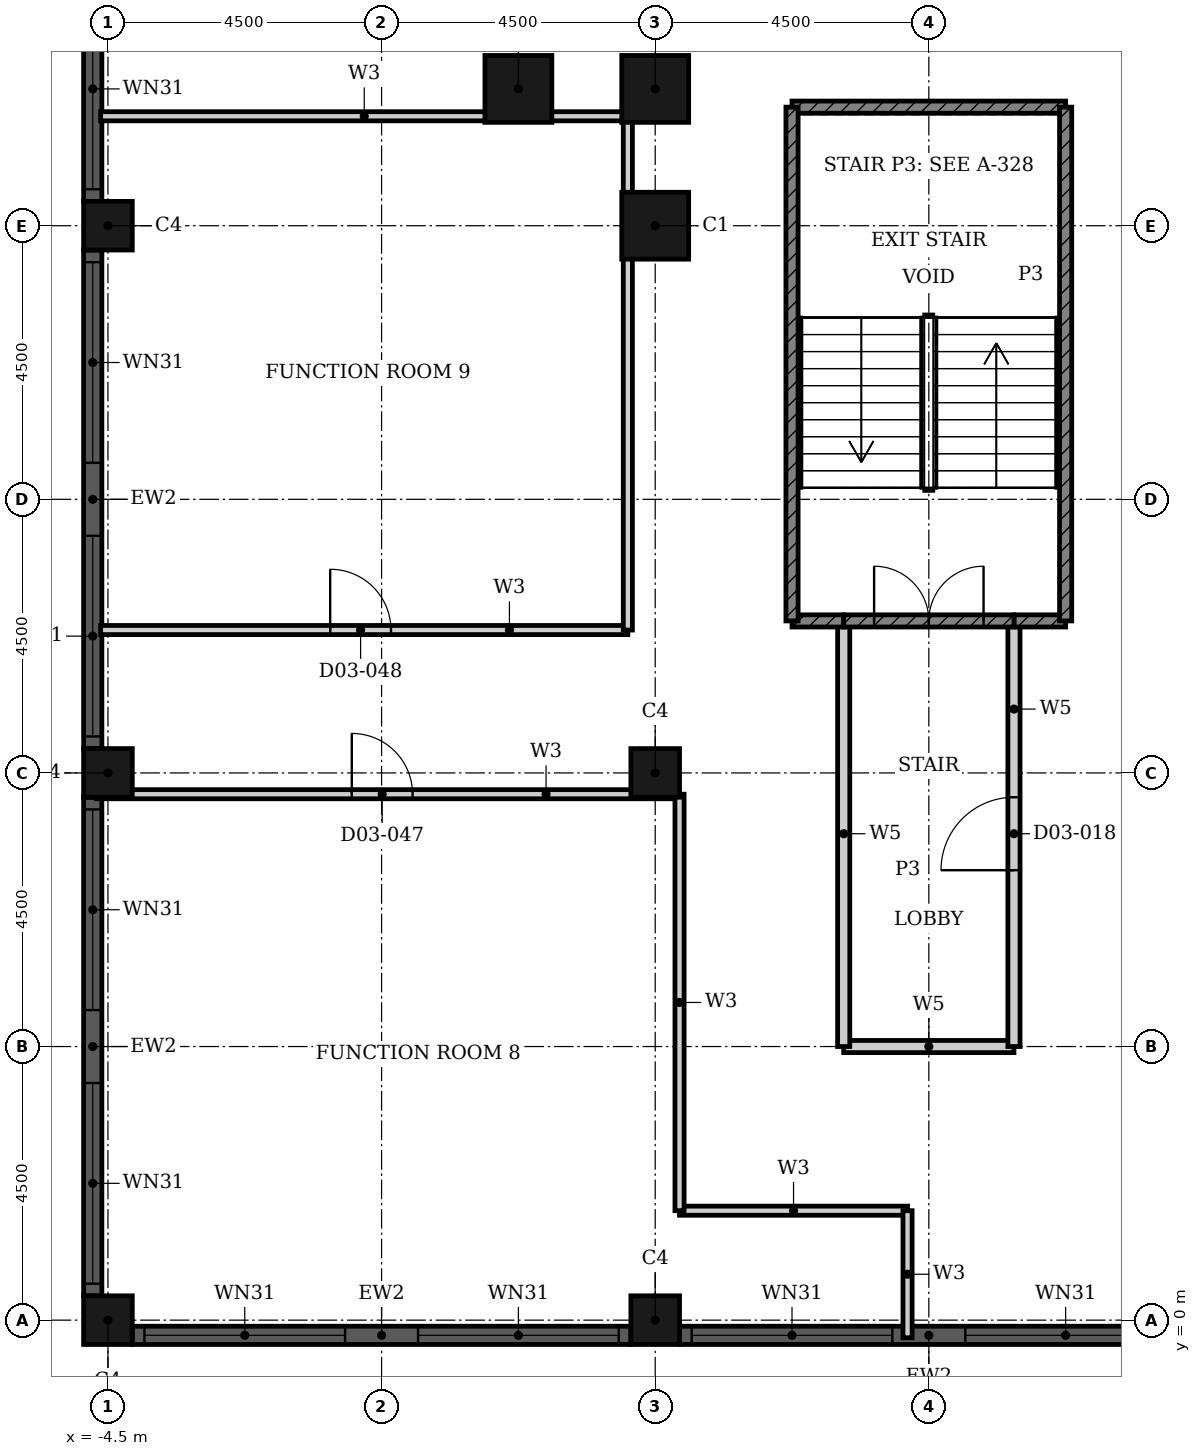
"""IFC4 building model, lengths in metres.
Left out: names, types, materials, properties, quantities, classifications, styles, units other than length and angle.
Written with IfcOpenShell. Run it as: python <this file> out.ifc"""

import sys

from ifc_helpers import new_model, si_unit, direction, frame, frame_2d, origin, origin_2d, place, context, subcontext, project, spatial, rectangle, hollow_rectangle, extrude, element, fill, save


model = new_model("IFC4")
c1 = context("Model", 3, precision=1e-05, world=origin(), true_north=direction((0.0, 1.0)))
c2 = subcontext(c1, "Body", "Model", "MODEL_VIEW")
j1 = project(units=[si_unit("LENGTHUNIT", "METRE"), si_unit("PLANEANGLEUNIT", "RADIAN")], contexts=[c1])
p1 = place(None, origin())
s1 = spatial("IfcSite", under=j1, at=p1, CompositionType="ELEMENT")
p2 = place(p1, origin())
s2 = spatial("IfcBuilding", under=s1, at=p2, CompositionType="ELEMENT")
p3 = place(p2, frame((0.0, 0.0, 17.4)))
s3 = spatial("IfcBuildingStorey", under=s2, at=p3, CompositionType="ELEMENT", Elevation=17.4)
for number, where, z_axis, x_axis in (
    (1, (2.25, 20.25, 0.0), (0.0, 0.0, 1.0), (1.0, 0.0, 0.0)),
    (2, (4.5, 20.25, 0.0), (0.0, 0.0, 1.0), (1.0, 0.0, 0.0)),
    (3, (4.5, 18.0, 0.0), (0.0, 0.0, 1.0), (1.0, 0.0, 0.0)),
):
    element("IfcColumn", number, at=place(p3, frame(where, z_axis=z_axis, x_axis=x_axis)), inside=s3, PredefinedType="COLUMN", context=c2, shape_type="SweptSolid", body=[
        extrude(hollow_rectangle(XDim=1.1, YDim=1.1, WallThickness=0.036, at=origin_2d()), origin(), (0.0, 0.0, 1.0), 6.6),
    ])
for number, where, z_axis, x_axis in (
    (4, (-4.5, 0.0, 0.0), (0.0, 0.0, 1.0), (1.0, 0.0, 0.0)),
    (5, (-4.5, 9.0, 0.0), (0.0, 0.0, 1.0), (1.0, 0.0, 0.0)),
    (6, (-4.5, 18.0, 0.0), (0.0, 0.0, 1.0), (1.0, 0.0, 0.0)),
    (7, (4.5, 0.0, 0.0), (0.0, 0.0, 1.0), (1.0, 0.0, 0.0)),
    (8, (4.5, 9.0, 0.0), (0.0, 0.0, 1.0), (1.0, 0.0, 0.0)),
):
    element("IfcColumn", number, at=place(p3, frame(where, z_axis=z_axis, x_axis=x_axis)), inside=s3, PredefinedType="COLUMN", context=c2, shape_type="SweptSolid", body=[
        extrude(hollow_rectangle(XDim=0.8, YDim=0.8, WallThickness=0.025, at=origin_2d()), origin(), (0.0, 0.0, 1.0), 6.6),
    ])
p4 = place(p3, frame((-4.75, 26.6, 0.0), z_axis=(0.0, 0.0, 1.0), x_axis=(0.0, -1.0, 0.0)))
e9 = element("IfcWall", 9, at=p4, inside=s3, PredefinedType="SOLIDWALL", context=c2, shape_type="SweptSolid", body=[
    extrude(rectangle(XDim=8.2, YDim=0.3, at=frame_2d((4.1, 0.0))), origin(), (0.0, 0.0, 1.0), 6.6),
])
p5 = place(p4, frame((0.2, 0.0, 0.9)))
e10 = element("IfcOpeningElement", 10, at=p5, cuts=e9, PredefinedType="OPENING", context=c2, shape_type="SweptSolid", body=[
    extrude(rectangle(XDim=3.3, YDim=3.6, at=frame_2d((1.65, 1.8))), frame((0.0, 0.16, 0.0), z_axis=(0.0, -1.0, 0.0), x_axis=(1.0, 0.0, 0.0)), (0.0, 0.0, 1.0), 0.32),
])
p6 = place(p4, frame((4.7, 0.0, 0.9)))
e11 = element("IfcOpeningElement", 11, at=p6, cuts=e9, PredefinedType="OPENING", context=c2, shape_type="SweptSolid", body=[
    extrude(rectangle(XDim=3.3, YDim=3.6, at=frame_2d((1.65, 1.8))), frame((0.0, 0.16, 0.0), z_axis=(0.0, -1.0, 0.0), x_axis=(1.0, 0.0, 0.0)), (0.0, 0.0, 1.0), 0.32),
])
p7 = place(p3, frame((-4.75, 17.6, 0.0), z_axis=(0.0, 0.0, 1.0), x_axis=(0.0, -1.0, 0.0)))
e12 = element("IfcWall", 12, at=p7, inside=s3, PredefinedType="SOLIDWALL", context=c2, shape_type="SweptSolid", body=[
    extrude(rectangle(XDim=8.2, YDim=0.3, at=frame_2d((4.1, 0.0))), origin(), (0.0, 0.0, 1.0), 6.6),
])
p8 = place(p7, frame((0.2, 0.0, 0.9)))
e13 = element("IfcOpeningElement", 13, at=p8, cuts=e12, PredefinedType="OPENING", context=c2, shape_type="SweptSolid", body=[
    extrude(rectangle(XDim=3.3, YDim=3.6, at=frame_2d((1.65, 1.8))), frame((0.0, 0.16, 0.0), z_axis=(0.0, -1.0, 0.0), x_axis=(1.0, 0.0, 0.0)), (0.0, 0.0, 1.0), 0.32),
])
p9 = place(p7, frame((4.7, 0.0, 0.9)))
e14 = element("IfcOpeningElement", 14, at=p9, cuts=e12, PredefinedType="OPENING", context=c2, shape_type="SweptSolid", body=[
    extrude(rectangle(XDim=3.3, YDim=3.6, at=frame_2d((1.65, 1.8))), frame((0.0, 0.16, 0.0), z_axis=(0.0, -1.0, 0.0), x_axis=(1.0, 0.0, 0.0)), (0.0, 0.0, 1.0), 0.32),
])
p10 = place(p3, frame((-4.75, 8.6, 0.0), z_axis=(0.0, 0.0, 1.0), x_axis=(0.0, -1.0, 0.0)))
e15 = element("IfcWall", 15, at=p10, inside=s3, PredefinedType="SOLIDWALL", context=c2, shape_type="SweptSolid", body=[
    extrude(rectangle(XDim=8.2, YDim=0.3, at=frame_2d((4.1, 0.0))), origin(), (0.0, 0.0, 1.0), 6.6),
])
p11 = place(p10, frame((0.2, 0.0, 0.9)))
e16 = element("IfcOpeningElement", 16, at=p11, cuts=e15, PredefinedType="OPENING", context=c2, shape_type="SweptSolid", body=[
    extrude(rectangle(XDim=3.3, YDim=3.6, at=frame_2d((1.65, 1.8))), frame((0.0, 0.16, 0.0), z_axis=(0.0, -1.0, 0.0), x_axis=(1.0, 0.0, 0.0)), (0.0, 0.0, 1.0), 0.32),
])
p12 = place(p10, frame((4.7, 0.0, 0.9)))
e17 = element("IfcOpeningElement", 17, at=p12, cuts=e15, PredefinedType="OPENING", context=c2, shape_type="SweptSolid", body=[
    extrude(rectangle(XDim=3.3, YDim=3.6, at=frame_2d((1.65, 1.8))), frame((0.0, 0.16, 0.0), z_axis=(0.0, -1.0, 0.0), x_axis=(1.0, 0.0, 0.0)), (0.0, 0.0, 1.0), 0.32),
])
p13 = place(p3, frame((-4.1, -0.25, 0.0), z_axis=(0.0, 0.0, 1.0), x_axis=(1.0, 0.0, 0.0)))
e18 = element("IfcWall", 18, at=p13, inside=s3, PredefinedType="SOLIDWALL", context=c2, shape_type="SweptSolid", body=[
    extrude(rectangle(XDim=8.2, YDim=0.3, at=frame_2d((4.1, 0.0))), origin(), (0.0, 0.0, 1.0), 6.6),
])
p14 = place(p13, frame((0.2, 0.0, 0.9)))
e19 = element("IfcOpeningElement", 19, at=p14, cuts=e18, PredefinedType="OPENING", context=c2, shape_type="SweptSolid", body=[
    extrude(rectangle(XDim=3.3, YDim=3.6, at=frame_2d((1.65, 1.8))), frame((0.0, 0.16, 0.0), z_axis=(0.0, -1.0, 0.0), x_axis=(1.0, 0.0, 0.0)), (0.0, 0.0, 1.0), 0.32),
])
p15 = place(p13, frame((4.7, 0.0, 0.9)))
e20 = element("IfcOpeningElement", 20, at=p15, cuts=e18, PredefinedType="OPENING", context=c2, shape_type="SweptSolid", body=[
    extrude(rectangle(XDim=3.3, YDim=3.6, at=frame_2d((1.65, 1.8))), frame((0.0, 0.16, 0.0), z_axis=(0.0, -1.0, 0.0), x_axis=(1.0, 0.0, 0.0)), (0.0, 0.0, 1.0), 0.32),
])
p16 = place(p3, frame((4.9, -0.25, 0.0), z_axis=(0.0, 0.0, 1.0), x_axis=(1.0, 0.0, 0.0)))
e21 = element("IfcWall", 21, at=p16, inside=s3, PredefinedType="SOLIDWALL", context=c2, shape_type="SweptSolid", body=[
    extrude(rectangle(XDim=8.2, YDim=0.3, at=frame_2d((4.1, 0.0))), origin(), (0.0, 0.0, 1.0), 6.6),
])
p17 = place(p16, frame((0.2, 0.0, 0.9)))
e22 = element("IfcOpeningElement", 22, at=p17, cuts=e21, PredefinedType="OPENING", context=c2, shape_type="SweptSolid", body=[
    extrude(rectangle(XDim=3.3, YDim=3.6, at=frame_2d((1.65, 1.8))), frame((0.0, 0.16, 0.0), z_axis=(0.0, -1.0, 0.0), x_axis=(1.0, 0.0, 0.0)), (0.0, 0.0, 1.0), 0.32),
])
p18 = place(p16, frame((4.7, 0.0, 0.9)))
e23 = element("IfcOpeningElement", 23, at=p18, cuts=e21, PredefinedType="OPENING", context=c2, shape_type="SweptSolid", body=[
    extrude(rectangle(XDim=3.3, YDim=3.6, at=frame_2d((1.65, 1.8))), frame((0.0, 0.16, 0.0), z_axis=(0.0, -1.0, 0.0), x_axis=(1.0, 0.0, 0.0)), (0.0, 0.0, 1.0), 0.32),
])
p19 = place(p3, frame((4.9, 1.8, 0.0), z_axis=(0.0, 0.0, 1.0), x_axis=(1.0, 0.0, 0.0)))
e24 = element("IfcWall", 24, at=p19, inside=s3, PredefinedType="PARTITIONING", context=c2, shape_type="SweptSolid", body=[
    extrude(rectangle(XDim=3.75, YDim=0.15, at=frame_2d((1.875, 0.0))), origin(), (0.0, 0.0, 1.0), 6.25),
])
p20 = place(p3, frame((-4.62, 11.35, 0.0), z_axis=(0.0, 0.0, 1.0), x_axis=(1.0, 0.0, 0.0)))
e25 = element("IfcWall", 25, at=p20, inside=s3, PredefinedType="PARTITIONING", context=c2, shape_type="SweptSolid", body=[
    extrude(rectangle(XDim=8.67, YDim=0.15, at=frame_2d((4.335, 0.0))), origin(), (0.0, 0.0, 1.0), 6.25),
])
p21 = place(p20, frame((3.775, 0.0, 0.0)))
e26 = element("IfcOpeningElement", 26, at=p21, cuts=e25, PredefinedType="OPENING", context=c2, shape_type="SweptSolid", body=[
    extrude(rectangle(XDim=1.0, YDim=2.1, at=frame_2d((0.5, 1.05))), frame((0.0, 0.085, 0.0), z_axis=(0.0, -1.0, 0.0), x_axis=(1.0, 0.0, 0.0)), (0.0, 0.0, 1.0), 0.17),
])
p22 = place(p3, frame((-4.62, 19.8, 0.0), z_axis=(0.0, 0.0, 1.0), x_axis=(1.0, 0.0, 0.0)))
e27 = element("IfcWall", 27, at=p22, inside=s3, PredefinedType="PARTITIONING", context=c2, shape_type="SweptSolid", body=[
    extrude(rectangle(XDim=8.67, YDim=0.15, at=frame_2d((4.335, 0.0))), origin(), (0.0, 0.0, 1.0), 6.25),
])
p23 = place(p3, frame((-4.69, 8.65, 0.0), z_axis=(0.0, 0.0, 1.0), x_axis=(1.0, 0.0, 0.0)))
e28 = element("IfcWall", 28, at=p23, inside=s3, PredefinedType="PARTITIONING", context=c2, shape_type="SweptSolid", body=[
    extrude(rectangle(XDim=9.59, YDim=0.15, at=frame_2d((4.795, 0.0))), origin(), (0.0, 0.0, 1.0), 6.25),
])
p24 = place(p23, frame((4.2, 0.0, 0.0)))
e29 = element("IfcOpeningElement", 29, at=p24, cuts=e28, PredefinedType="OPENING", context=c2, shape_type="SweptSolid", body=[
    extrude(rectangle(XDim=1.0, YDim=2.1, at=frame_2d((0.5, 1.05))), frame((0.0, 0.085, 0.0), z_axis=(0.0, -1.0, 0.0), x_axis=(1.0, 0.0, 0.0)), (0.0, 0.0, 1.0), 0.17),
])
p25 = place(p3, frame((4.05, 11.35, 0.0), z_axis=(0.0, 0.0, 1.0), x_axis=(0.0, 1.0, 0.0)))
e30 = element("IfcWall", 30, at=p25, inside=s3, PredefinedType="PARTITIONING", context=c2, shape_type="SweptSolid", body=[
    extrude(rectangle(XDim=8.45, YDim=0.15, at=frame_2d((4.225, 0.0))), origin(), (0.0, 0.0, 1.0), 6.25),
])
p26 = place(p3, frame((4.9, 1.8, 0.0), z_axis=(0.0, 0.0, 1.0), x_axis=(0.0, 1.0, 0.0)))
e31 = element("IfcWall", 31, at=p26, inside=s3, PredefinedType="PARTITIONING", context=c2, shape_type="SweptSolid", body=[
    extrude(rectangle(XDim=6.85, YDim=0.15, at=frame_2d((3.425, 0.0))), origin(), (0.0, 0.0, 1.0), 6.25),
])
p27 = place(p3, frame((8.65, -0.29, 0.0), z_axis=(0.0, 0.0, 1.0), x_axis=(0.0, 1.0, 0.0)))
e32 = element("IfcWall", 32, at=p27, inside=s3, PredefinedType="PARTITIONING", context=c2, shape_type="SweptSolid", body=[
    extrude(rectangle(XDim=2.09, YDim=0.15, at=frame_2d((1.045, 0.0))), origin(), (0.0, 0.0, 1.0), 6.25),
])
p28 = place(p3, frame((7.6, 4.5, 0.0), z_axis=(0.0, 0.0, 1.0), x_axis=(1.0, 0.0, 0.0)))
e33 = element("IfcWall", 33, at=p28, inside=s3, PredefinedType="PARTITIONING", context=c2, shape_type="SweptSolid", body=[
    extrude(rectangle(XDim=2.8, YDim=0.2, at=frame_2d((1.4, 0.0))), origin(), (0.0, 0.0, 1.0), 6.25),
])
p29 = place(p3, frame((10.4, 4.5, 0.0), z_axis=(0.0, 0.0, 1.0), x_axis=(0.0, 1.0, 0.0)))
e34 = element("IfcWall", 34, at=p29, inside=s3, PredefinedType="PARTITIONING", context=c2, shape_type="SweptSolid", body=[
    extrude(rectangle(XDim=7.0, YDim=0.2, at=frame_2d((3.5, 0.0))), origin(), (0.0, 0.0, 1.0), 6.25),
])
p30 = place(p29, frame((2.9, 0.0, 0.0)))
e35 = element("IfcOpeningElement", 35, at=p30, cuts=e34, PredefinedType="OPENING", context=c2, shape_type="SweptSolid", body=[
    extrude(rectangle(XDim=1.2, YDim=2.1, at=frame_2d((0.6, 1.05))), frame((0.0, 0.11, 0.0), z_axis=(0.0, -1.0, 0.0), x_axis=(1.0, 0.0, 0.0)), (0.0, 0.0, 1.0), 0.22),
])
p31 = place(p3, frame((7.6, 4.5, 0.0), z_axis=(0.0, 0.0, 1.0), x_axis=(0.0, 1.0, 0.0)))
e36 = element("IfcWall", 36, at=p31, inside=s3, PredefinedType="PARTITIONING", context=c2, shape_type="SweptSolid", body=[
    extrude(rectangle(XDim=7.0, YDim=0.2, at=frame_2d((3.5, 0.0))), origin(), (0.0, 0.0, 1.0), 6.25),
])
for number, where, z_axis, x_axis in (
    (37, (6.75, 11.5, 0.0), (0.0, 0.0, 1.0), (1.0, 0.0, 0.0)),
    (38, (10.4, 11.5, 0.0), (0.0, 0.0, 1.0), (1.0, 0.0, 0.0)),
):
    element("IfcWall", number, at=place(p3, frame(where, z_axis=z_axis, x_axis=x_axis)), inside=s3, PredefinedType="SHEAR", context=c2, shape_type="SweptSolid", body=[
        extrude(rectangle(XDim=0.85, YDim=0.2, at=frame_2d((0.425, 0.0))), origin(), (0.0, 0.0, 1.0), 6.25),
    ])
p32 = place(p3, frame((7.6, 11.5, 0.0), z_axis=(0.0, 0.0, 1.0), x_axis=(1.0, 0.0, 0.0)))
e39 = element("IfcWall", 39, at=p32, inside=s3, PredefinedType="SHEAR", context=c2, shape_type="SweptSolid", body=[
    extrude(rectangle(XDim=2.8, YDim=0.2, at=frame_2d((1.4, 0.0))), origin(), (0.0, 0.0, 1.0), 6.25),
])
p33 = place(p32, frame((0.5, 0.0, 0.0)))
e40 = element("IfcOpeningElement", 40, at=p33, cuts=e39, PredefinedType="OPENING", context=c2, shape_type="SweptSolid", body=[
    extrude(rectangle(XDim=1.8, YDim=2.1, at=frame_2d((0.9, 1.05))), frame((0.0, 0.11, 0.0), z_axis=(0.0, -1.0, 0.0), x_axis=(1.0, 0.0, 0.0)), (0.0, 0.0, 1.0), 0.22),
])
p34 = place(p3, frame((6.75, 19.95, 0.0), z_axis=(0.0, 0.0, 1.0), x_axis=(1.0, 0.0, 0.0)))
e41 = element("IfcWall", 41, at=p34, inside=s3, PredefinedType="SHEAR", context=c2, shape_type="SweptSolid", body=[
    extrude(rectangle(XDim=4.5, YDim=0.2, at=frame_2d((2.25, 0.0))), origin(), (0.0, 0.0, 1.0), 6.25),
])
for number, where, z_axis, x_axis in (
    (42, (11.25, 11.5, 0.0), (0.0, 0.0, 1.0), (0.0, 1.0, 0.0)),
    (43, (6.75, 11.5, 0.0), (0.0, 0.0, 1.0), (0.0, 1.0, 0.0)),
):
    element("IfcWall", number, at=place(p3, frame(where, z_axis=z_axis, x_axis=x_axis)), inside=s3, PredefinedType="SHEAR", context=c2, shape_type="SweptSolid", body=[
        extrude(rectangle(XDim=8.45, YDim=0.2, at=frame_2d((4.225, 0.0))), origin(), (0.0, 0.0, 1.0), 6.25),
    ])
p35 = place(p6, origin())
e44 = element("IfcWindow", 44, at=p35, inside=s3, PartitioningType="SINGLE_PANEL", PredefinedType="WINDOW", context=c2, shape_type="SweptSolid", body=[
    extrude(rectangle(XDim=3.3, YDim=3.6, at=frame_2d((1.65, 1.8))), frame((0.0, 0.03, 0.0), z_axis=(0.0, -1.0, 0.0), x_axis=(1.0, 0.0, 0.0)), (0.0, 0.0, 1.0), 0.06),
])
fill(e11, e44)
p36 = place(p8, origin())
e45 = element("IfcWindow", 45, at=p36, inside=s3, PartitioningType="SINGLE_PANEL", PredefinedType="WINDOW", context=c2, shape_type="SweptSolid", body=[
    extrude(rectangle(XDim=3.3, YDim=3.6, at=frame_2d((1.65, 1.8))), frame((0.0, 0.03, 0.0), z_axis=(0.0, -1.0, 0.0), x_axis=(1.0, 0.0, 0.0)), (0.0, 0.0, 1.0), 0.06),
])
fill(e13, e45)
p37 = place(p9, origin())
e46 = element("IfcWindow", 46, at=p37, inside=s3, PartitioningType="SINGLE_PANEL", PredefinedType="WINDOW", context=c2, shape_type="SweptSolid", body=[
    extrude(rectangle(XDim=3.3, YDim=3.6, at=frame_2d((1.65, 1.8))), frame((0.0, 0.03, 0.0), z_axis=(0.0, -1.0, 0.0), x_axis=(1.0, 0.0, 0.0)), (0.0, 0.0, 1.0), 0.06),
])
fill(e14, e46)
p38 = place(p11, origin())
e47 = element("IfcWindow", 47, at=p38, inside=s3, PartitioningType="SINGLE_PANEL", PredefinedType="WINDOW", context=c2, shape_type="SweptSolid", body=[
    extrude(rectangle(XDim=3.3, YDim=3.6, at=frame_2d((1.65, 1.8))), frame((0.0, 0.03, 0.0), z_axis=(0.0, -1.0, 0.0), x_axis=(1.0, 0.0, 0.0)), (0.0, 0.0, 1.0), 0.06),
])
fill(e16, e47)
p39 = place(p12, origin())
e48 = element("IfcWindow", 48, at=p39, inside=s3, PartitioningType="SINGLE_PANEL", PredefinedType="WINDOW", context=c2, shape_type="SweptSolid", body=[
    extrude(rectangle(XDim=3.3, YDim=3.6, at=frame_2d((1.65, 1.8))), frame((0.0, 0.03, 0.0), z_axis=(0.0, -1.0, 0.0), x_axis=(1.0, 0.0, 0.0)), (0.0, 0.0, 1.0), 0.06),
])
fill(e17, e48)
p40 = place(p14, origin())
e49 = element("IfcWindow", 49, at=p40, inside=s3, PartitioningType="SINGLE_PANEL", PredefinedType="WINDOW", context=c2, shape_type="SweptSolid", body=[
    extrude(rectangle(XDim=3.3, YDim=3.6, at=frame_2d((1.65, 1.8))), frame((0.0, 0.03, 0.0), z_axis=(0.0, -1.0, 0.0), x_axis=(1.0, 0.0, 0.0)), (0.0, 0.0, 1.0), 0.06),
])
fill(e19, e49)
p41 = place(p15, origin())
e50 = element("IfcWindow", 50, at=p41, inside=s3, PartitioningType="SINGLE_PANEL", PredefinedType="WINDOW", context=c2, shape_type="SweptSolid", body=[
    extrude(rectangle(XDim=3.3, YDim=3.6, at=frame_2d((1.65, 1.8))), frame((0.0, 0.03, 0.0), z_axis=(0.0, -1.0, 0.0), x_axis=(1.0, 0.0, 0.0)), (0.0, 0.0, 1.0), 0.06),
])
fill(e20, e50)
p42 = place(p17, origin())
e51 = element("IfcWindow", 51, at=p42, inside=s3, PartitioningType="SINGLE_PANEL", PredefinedType="WINDOW", context=c2, shape_type="SweptSolid", body=[
    extrude(rectangle(XDim=3.3, YDim=3.6, at=frame_2d((1.65, 1.8))), frame((0.0, 0.03, 0.0), z_axis=(0.0, -1.0, 0.0), x_axis=(1.0, 0.0, 0.0)), (0.0, 0.0, 1.0), 0.06),
])
fill(e22, e51)
p43 = place(p18, origin())
e52 = element("IfcWindow", 52, at=p43, inside=s3, PartitioningType="SINGLE_PANEL", PredefinedType="WINDOW", context=c2, shape_type="SweptSolid", body=[
    extrude(rectangle(XDim=3.3, YDim=3.6, at=frame_2d((1.65, 1.8))), frame((0.0, 0.03, 0.0), z_axis=(0.0, -1.0, 0.0), x_axis=(1.0, 0.0, 0.0)), (0.0, 0.0, 1.0), 0.06),
])
fill(e23, e52)
p44 = place(p30, origin())
e53 = element("IfcDoor", 53, at=p44, inside=s3, OperationType="SINGLE_SWING_LEFT", PredefinedType="DOOR", context=c2, shape_type="SweptSolid", body=[
    extrude(rectangle(XDim=1.2, YDim=2.1, at=frame_2d((0.6, 1.05))), frame((0.0, 0.025, 0.0), z_axis=(0.0, -1.0, 0.0), x_axis=(1.0, 0.0, 0.0)), (0.0, 0.0, 1.0), 0.05),
])
fill(e35, e53)
p45 = place(p33, origin())
e54 = element("IfcDoor", 54, at=p45, inside=s3, OperationType="DOUBLE_DOOR_SINGLE_SWING", PredefinedType="DOOR", context=c2, shape_type="SweptSolid", body=[
    extrude(rectangle(XDim=1.8, YDim=2.1, at=frame_2d((0.9, 1.05))), frame((0.0, 0.025, 0.0), z_axis=(0.0, -1.0, 0.0), x_axis=(1.0, 0.0, 0.0)), (0.0, 0.0, 1.0), 0.05),
])
fill(e40, e54)
p46 = place(p24, origin())
e55 = element("IfcDoor", 55, at=p46, inside=s3, OperationType="SINGLE_SWING_LEFT", PredefinedType="DOOR", context=c2, shape_type="SweptSolid", body=[
    extrude(rectangle(XDim=1.0, YDim=2.1, at=frame_2d((0.5, 1.05))), frame((0.0, 0.025, 0.0), z_axis=(0.0, -1.0, 0.0), x_axis=(1.0, 0.0, 0.0)), (0.0, 0.0, 1.0), 0.05),
])
fill(e29, e55)
p47 = place(p21, origin())
e56 = element("IfcDoor", 56, at=p47, inside=s3, OperationType="SINGLE_SWING_RIGHT", PredefinedType="DOOR", context=c2, shape_type="SweptSolid", body=[
    extrude(rectangle(XDim=1.0, YDim=2.1, at=frame_2d((0.5, 1.05))), frame((0.0, 0.025, 0.0), z_axis=(0.0, -1.0, 0.0), x_axis=(1.0, 0.0, 0.0)), (0.0, 0.0, 1.0), 0.05),
])
fill(e26, e56)
save(model, sys.argv[1])
